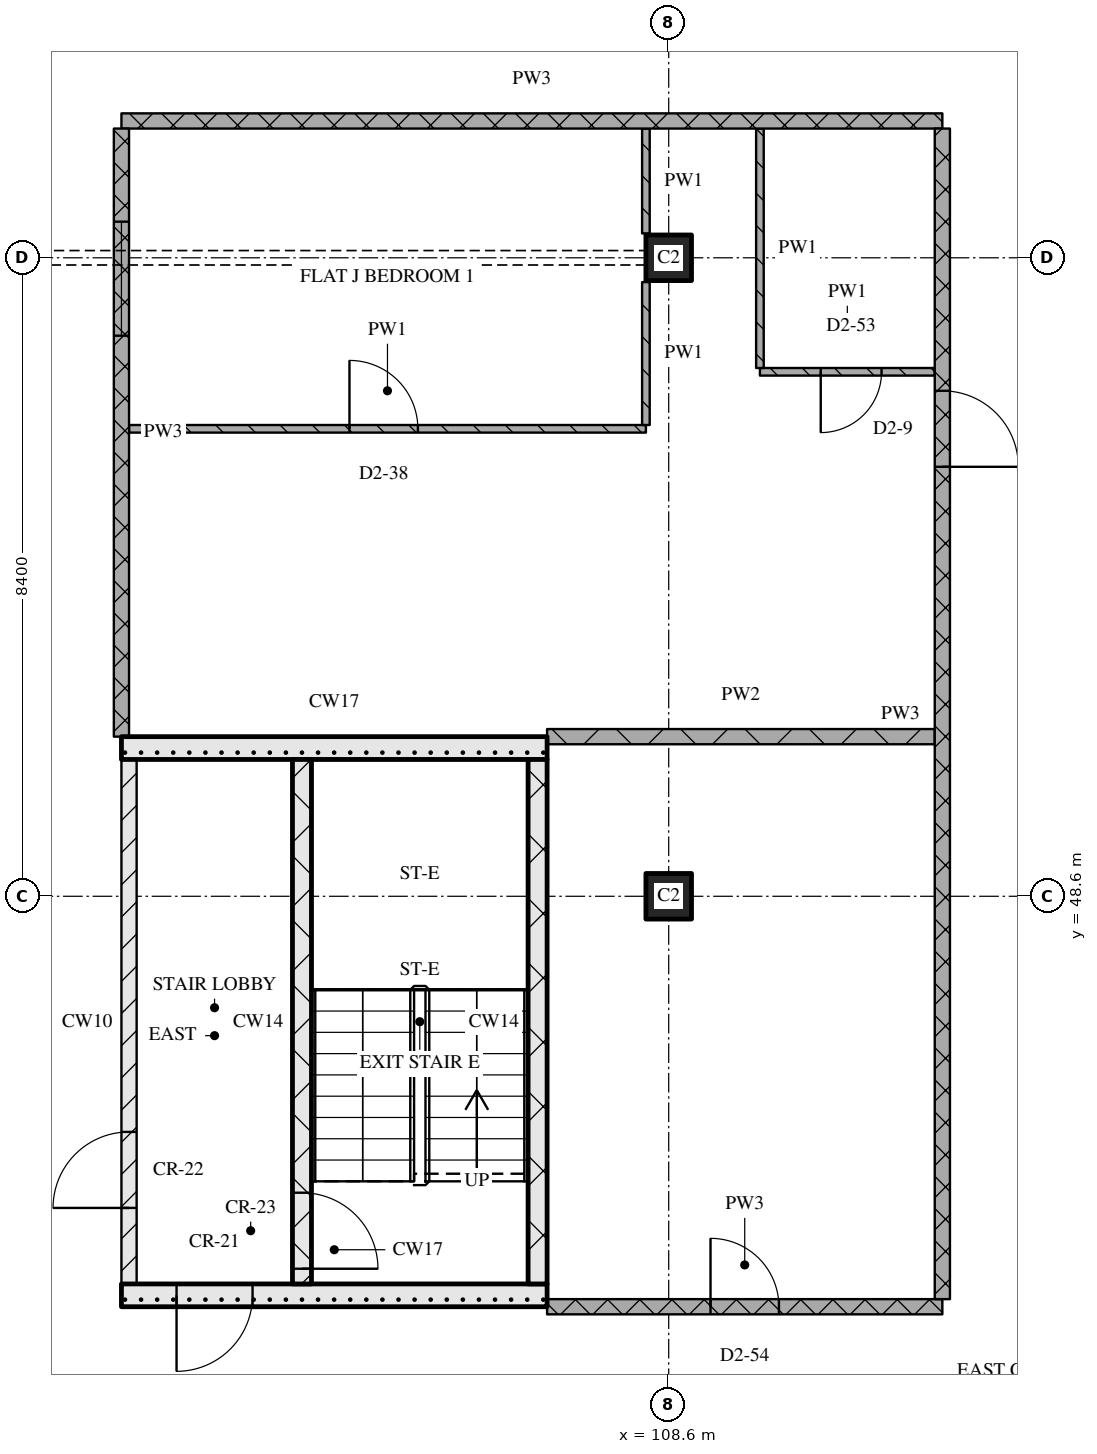
"""IFC4 building model, lengths in metres.
Left out: names, types, materials, properties, quantities, classifications, styles, units other than length and angle.
Written with IfcOpenShell. Run it as: python <this file> out.ifc"""

import sys

from ifc_helpers import new_model, si_unit, direction, frame, frame_2d, origin, origin_2d, place, context, subcontext, project, spatial, rectangle, extrude, element, fill, save


model = new_model("IFC4")
c1 = context("Model", 3, precision=1e-05, world=origin(), true_north=direction((0.0, 1.0)))
c2 = subcontext(c1, "Body", "Model", "MODEL_VIEW")
j1 = project(units=[si_unit("LENGTHUNIT", "METRE"), si_unit("PLANEANGLEUNIT", "RADIAN")], contexts=[c1])
p1 = place(None, origin())
s1 = spatial("IfcSite", under=j1, at=p1, CompositionType="ELEMENT")
p2 = place(p1, origin())
s2 = spatial("IfcBuilding", under=s1, at=p2, CompositionType="ELEMENT")
p3 = place(p2, frame((0.0, 0.0, 223.5)))
s3 = spatial("IfcBuildingStorey", under=s2, at=p3, CompositionType="ELEMENT", Elevation=223.5)
for number, where, z_axis, x_axis in (
    (1, (108.6, 48.6, 0.0), (0.0, 0.0, 1.0), (1.0, 0.0, 0.0)),
    (2, (108.6, 57.0, 0.0), (0.0, 0.0, 1.0), (1.0, 0.0, 0.0)),
):
    element("IfcColumn", number, at=place(p3, frame(where, z_axis=z_axis, x_axis=x_axis)), inside=s3, PredefinedType="COLUMN", context=c2, shape_type="SweptSolid", body=[
        extrude(rectangle(XDim=0.6, YDim=0.6, at=origin_2d()), origin(), (0.0, 0.0, 1.0), 3.6),
    ])
p4 = place(p3, frame((101.4, 43.35, 0.0), z_axis=(0.0, 0.0, 1.0), x_axis=(1.0, 0.0, 0.0)))
e3 = element("IfcWall", 3, at=p4, inside=s3, PredefinedType="SOLIDWALL", context=c2, shape_type="SweptSolid", body=[
    extrude(rectangle(XDim=5.6, YDim=0.3, at=frame_2d((2.8, 0.0))), origin(), (0.0, 0.0, 1.0), 3.32),
])
p5 = place(p4, frame((0.725, 0.0, 0.0)))
e4 = element("IfcOpeningElement", 4, at=p5, cuts=e3, PredefinedType="OPENING", context=c2, shape_type="SweptSolid", body=[
    extrude(rectangle(XDim=1.0, YDim=2.1, at=frame_2d((0.5, 1.05))), frame((0.0, 0.16, 0.0), z_axis=(0.0, -1.0, 0.0), x_axis=(1.0, 0.0, 0.0)), (0.0, 0.0, 1.0), 0.32),
])
p6 = place(p3, frame((101.5, 43.5, 0.0), z_axis=(0.0, 0.0, 1.0), x_axis=(0.0, 1.0, 0.0)))
e5 = element("IfcWall", 5, at=p6, inside=s3, PredefinedType="PARTITIONING", context=c2, shape_type="SweptSolid", body=[
    extrude(rectangle(XDim=6.9, YDim=0.2, at=frame_2d((3.45, 0.0))), origin(), (0.0, 0.0, 1.0), 3.32),
])
p7 = place(p6, frame((1.0, 0.0, 0.0)))
e6 = element("IfcOpeningElement", 6, at=p7, cuts=e5, PredefinedType="OPENING", context=c2, shape_type="SweptSolid", body=[
    extrude(rectangle(XDim=1.0, YDim=2.1, at=frame_2d((0.5, 1.05))), frame((0.0, 0.11, 0.0), z_axis=(0.0, -1.0, 0.0), x_axis=(1.0, 0.0, 0.0)), (0.0, 0.0, 1.0), 0.22),
])
p8 = place(p3, frame((103.775, 43.5, 0.0), z_axis=(0.0, 0.0, 1.0), x_axis=(0.0, 1.0, 0.0)))
e7 = element("IfcWall", 7, at=p8, inside=s3, PredefinedType="SOLIDWALL", context=c2, shape_type="SweptSolid", body=[
    extrude(rectangle(XDim=6.9, YDim=0.25, at=frame_2d((3.45, 0.0))), origin(), (0.0, 0.0, 1.0), 3.32),
])
p9 = place(p8, frame((0.2, 0.0, 0.0)))
e8 = element("IfcOpeningElement", 8, at=p9, cuts=e7, PredefinedType="OPENING", context=c2, shape_type="SweptSolid", body=[
    extrude(rectangle(XDim=1.0, YDim=2.1, at=frame_2d((0.5, 1.05))), frame((0.0, 0.135, 0.0), z_axis=(0.0, -1.0, 0.0), x_axis=(1.0, 0.0, 0.0)), (0.0, 0.0, 1.0), 0.27),
])
p10 = place(p3, frame((106.875, 43.5, 0.0), z_axis=(0.0, 0.0, 1.0), x_axis=(0.0, 1.0, 0.0)))
e9 = element("IfcWall", 9, at=p10, inside=s3, PredefinedType="SOLIDWALL", context=c2, shape_type="SweptSolid", body=[
    extrude(rectangle(XDim=6.9, YDim=0.25, at=frame_2d((3.45, 0.0))), origin(), (0.0, 0.0, 1.0), 3.32),
])
p11 = place(p3, frame((101.4, 50.55, 0.0), z_axis=(0.0, 0.0, 1.0), x_axis=(1.0, 0.0, 0.0)))
e10 = element("IfcWall", 10, at=p11, inside=s3, PredefinedType="SOLIDWALL", context=c2, shape_type="SweptSolid", body=[
    extrude(rectangle(XDim=5.6, YDim=0.3, at=frame_2d((2.8, 0.0))), origin(), (0.0, 0.0, 1.0), 3.32),
])
p12 = place(p3, frame((107.0, 43.2, 0.0), z_axis=(0.0, 0.0, 1.0), x_axis=(1.0, 0.0, 0.0)))
e11 = element("IfcWall", 11, at=p12, inside=s3, PredefinedType="PARTITIONING", context=c2, shape_type="SweptSolid", body=[
    extrude(rectangle(XDim=5.2, YDim=0.2, at=frame_2d((2.6, 0.0))), origin(), (0.0, 0.0, 1.0), 3.32),
])
p13 = place(p12, frame((2.15, 0.0, 0.0)))
e12 = element("IfcOpeningElement", 12, at=p13, cuts=e11, PredefinedType="OPENING", context=c2, shape_type="SweptSolid", body=[
    extrude(rectangle(XDim=0.9, YDim=2.1, at=frame_2d((0.45, 1.05))), frame((0.0, 0.11, 0.0), z_axis=(0.0, -1.0, 0.0), x_axis=(1.0, 0.0, 0.0)), (0.0, 0.0, 1.0), 0.22),
])
p14 = place(p3, frame((107.0, 50.7, 0.0), z_axis=(0.0, 0.0, 1.0), x_axis=(1.0, 0.0, 0.0)))
e13 = element("IfcWall", 13, at=p14, inside=s3, PredefinedType="PARTITIONING", context=c2, shape_type="SweptSolid", body=[
    extrude(rectangle(XDim=5.1, YDim=0.2, at=frame_2d((2.55, 0.0))), origin(), (0.0, 0.0, 1.0), 3.32),
])
p15 = place(p3, frame((101.5, 54.75, 0.0), z_axis=(0.0, 0.0, 1.0), x_axis=(1.0, 0.0, 0.0)))
e14 = element("IfcWall", 14, at=p15, inside=s3, PredefinedType="PARTITIONING", context=c2, shape_type="SweptSolid", body=[
    extrude(rectangle(XDim=6.8, YDim=0.1, at=frame_2d((3.4, 0.0))), origin(), (0.0, 0.0, 1.0), 3.32),
])
p16 = place(p15, frame((2.9, 0.0, 0.0)))
e15 = element("IfcOpeningElement", 15, at=p16, cuts=e14, PredefinedType="OPENING", context=c2, shape_type="SweptSolid", body=[
    extrude(rectangle(XDim=0.9, YDim=2.1, at=frame_2d((0.45, 1.05))), frame((0.0, 0.06, 0.0), z_axis=(0.0, -1.0, 0.0), x_axis=(1.0, 0.0, 0.0)), (0.0, 0.0, 1.0), 0.12),
])
p17 = place(p3, frame((109.8, 55.5, 0.0), z_axis=(0.0, 0.0, 1.0), x_axis=(1.0, 0.0, 0.0)))
e16 = element("IfcWall", 16, at=p17, inside=s3, PredefinedType="PARTITIONING", context=c2, shape_type="SweptSolid", body=[
    extrude(rectangle(XDim=2.3, YDim=0.1, at=frame_2d((1.15, 0.0))), origin(), (0.0, 0.0, 1.0), 3.32),
])
p18 = place(p17, frame((0.8, 0.0, 0.0)))
e17 = element("IfcOpeningElement", 17, at=p18, cuts=e16, PredefinedType="OPENING", context=c2, shape_type="SweptSolid", body=[
    extrude(rectangle(XDim=0.8, YDim=2.1, at=frame_2d((0.4, 1.05))), frame((0.0, 0.06, 0.0), z_axis=(0.0, -1.0, 0.0), x_axis=(1.0, 0.0, 0.0)), (0.0, 0.0, 1.0), 0.12),
])
p19 = place(p3, frame((101.4, 58.8, 0.0), z_axis=(0.0, 0.0, 1.0), x_axis=(1.0, 0.0, 0.0)))
e18 = element("IfcWall", 18, at=p19, inside=s3, PredefinedType="PARTITIONING", context=c2, shape_type="SweptSolid", body=[
    extrude(rectangle(XDim=10.8, YDim=0.2, at=frame_2d((5.4, 0.0))), origin(), (0.0, 0.0, 1.0), 3.32),
])
p20 = place(p3, frame((101.4, 58.7, 0.0), z_axis=(0.0, 0.0, 1.0), x_axis=(0.0, -1.0, 0.0)))
e19 = element("IfcWall", 19, at=p20, inside=s3, PredefinedType="PARTITIONING", context=c2, shape_type="SweptSolid", body=[
    extrude(rectangle(XDim=8.0, YDim=0.2, at=frame_2d((4.0, 0.0))), origin(), (0.0, 0.0, 1.0), 3.32),
])
p21 = place(p20, frame((1.225, 0.0, 0.9)))
e20 = element("IfcOpeningElement", 20, at=p21, cuts=e19, PredefinedType="OPENING", context=c2, shape_type="SweptSolid", body=[
    extrude(rectangle(XDim=1.5, YDim=1.5, at=frame_2d((0.75, 0.75))), frame((0.0, 0.11, 0.0), z_axis=(0.0, -1.0, 0.0), x_axis=(1.0, 0.0, 0.0)), (0.0, 0.0, 1.0), 0.22),
])
p22 = place(p3, frame((108.3, 56.68, 0.0), z_axis=(0.0, 0.0, 1.0), x_axis=(0.0, -1.0, 0.0)))
e21 = element("IfcWall", 21, at=p22, inside=s3, PredefinedType="PARTITIONING", context=c2, shape_type="SweptSolid", body=[
    extrude(rectangle(XDim=1.88, YDim=0.1, at=frame_2d((0.94, 0.0))), origin(), (0.0, 0.0, 1.0), 3.32),
])
p23 = place(p3, frame((108.3, 58.7, 0.0), z_axis=(0.0, 0.0, 1.0), x_axis=(0.0, -1.0, 0.0)))
e22 = element("IfcWall", 22, at=p23, inside=s3, PredefinedType="PARTITIONING", context=c2, shape_type="SweptSolid", body=[
    extrude(rectangle(XDim=1.38, YDim=0.1, at=frame_2d((0.69, 0.0))), origin(), (0.0, 0.0, 1.0), 3.32),
])
p24 = place(p3, frame((109.8, 58.7, 0.0), z_axis=(0.0, 0.0, 1.0), x_axis=(0.0, -1.0, 0.0)))
e23 = element("IfcWall", 23, at=p24, inside=s3, PredefinedType="PARTITIONING", context=c2, shape_type="SweptSolid", body=[
    extrude(rectangle(XDim=3.15, YDim=0.1, at=frame_2d((1.575, 0.0))), origin(), (0.0, 0.0, 1.0), 3.32),
])
p25 = place(p3, frame((112.2, 43.3, 0.0), z_axis=(0.0, 0.0, 1.0), x_axis=(0.0, 1.0, 0.0)))
e24 = element("IfcWall", 24, at=p25, inside=s3, PredefinedType="PARTITIONING", context=c2, shape_type="SweptSolid", body=[
    extrude(rectangle(XDim=15.4, YDim=0.2, at=frame_2d((7.7, 0.0))), origin(), (0.0, 0.0, 1.0), 3.32),
])
p26 = place(p25, frame((10.95, 0.0, 0.0)))
e25 = element("IfcOpeningElement", 25, at=p26, cuts=e24, PredefinedType="OPENING", context=c2, shape_type="SweptSolid", body=[
    extrude(rectangle(XDim=1.0, YDim=2.1, at=frame_2d((0.5, 1.05))), frame((0.0, 0.11, 0.0), z_axis=(0.0, -1.0, 0.0), x_axis=(1.0, 0.0, 0.0)), (0.0, 0.0, 1.0), 0.22),
])
p27 = place(p5, origin())
e26 = element("IfcDoor", 26, at=p27, inside=s3, OperationType="SINGLE_SWING_RIGHT", PredefinedType="DOOR", context=c2, shape_type="SweptSolid", body=[
    extrude(rectangle(XDim=1.0, YDim=2.1, at=frame_2d((0.5, 1.05))), frame((0.0, 0.025, 0.0), z_axis=(0.0, -1.0, 0.0), x_axis=(1.0, 0.0, 0.0)), (0.0, 0.0, 1.0), 0.05),
])
fill(e4, e26)
p28 = place(p9, origin())
e27 = element("IfcDoor", 27, at=p28, inside=s3, OperationType="SINGLE_SWING_RIGHT", PredefinedType="DOOR", context=c2, shape_type="SweptSolid", body=[
    extrude(rectangle(XDim=1.0, YDim=2.1, at=frame_2d((0.5, 1.05))), frame((0.0, 0.025, 0.0), z_axis=(0.0, -1.0, 0.0), x_axis=(1.0, 0.0, 0.0)), (0.0, 0.0, 1.0), 0.05),
])
fill(e8, e27)
p29 = place(p7, origin())
e28 = element("IfcDoor", 28, at=p29, inside=s3, OperationType="SINGLE_SWING_LEFT", PredefinedType="DOOR", context=c2, shape_type="SweptSolid", body=[
    extrude(rectangle(XDim=1.0, YDim=2.1, at=frame_2d((0.5, 1.05))), frame((0.0, 0.025, 0.0), z_axis=(0.0, -1.0, 0.0), x_axis=(1.0, 0.0, 0.0)), (0.0, 0.0, 1.0), 0.05),
])
fill(e6, e28)
p30 = place(p13, origin())
e29 = element("IfcDoor", 29, at=p30, inside=s3, OperationType="SINGLE_SWING_LEFT", PredefinedType="DOOR", context=c2, shape_type="SweptSolid", body=[
    extrude(rectangle(XDim=0.9, YDim=2.1, at=frame_2d((0.45, 1.05))), frame((0.0, 0.025, 0.0), z_axis=(0.0, -1.0, 0.0), x_axis=(1.0, 0.0, 0.0)), (0.0, 0.0, 1.0), 0.05),
])
fill(e12, e29)
p31 = place(p16, origin())
e30 = element("IfcDoor", 30, at=p31, inside=s3, OperationType="SINGLE_SWING_LEFT", PredefinedType="DOOR", context=c2, shape_type="SweptSolid", body=[
    extrude(rectangle(XDim=0.9, YDim=2.1, at=frame_2d((0.45, 1.05))), frame((0.0, 0.025, 0.0), z_axis=(0.0, -1.0, 0.0), x_axis=(1.0, 0.0, 0.0)), (0.0, 0.0, 1.0), 0.05),
])
fill(e15, e30)
p32 = place(p18, origin())
e31 = element("IfcDoor", 31, at=p32, inside=s3, OperationType="SINGLE_SWING_RIGHT", PredefinedType="DOOR", context=c2, shape_type="SweptSolid", body=[
    extrude(rectangle(XDim=0.8, YDim=2.1, at=frame_2d((0.4, 1.05))), frame((0.0, 0.025, 0.0), z_axis=(0.0, -1.0, 0.0), x_axis=(1.0, 0.0, 0.0)), (0.0, 0.0, 1.0), 0.05),
])
fill(e17, e31)
p33 = place(p26, origin())
e32 = element("IfcDoor", 32, at=p33, inside=s3, OperationType="SINGLE_SWING_RIGHT", PredefinedType="DOOR", context=c2, shape_type="SweptSolid", body=[
    extrude(rectangle(XDim=1.0, YDim=2.1, at=frame_2d((0.5, 1.05))), frame((0.0, 0.025, 0.0), z_axis=(0.0, -1.0, 0.0), x_axis=(1.0, 0.0, 0.0)), (0.0, 0.0, 1.0), 0.05),
])
fill(e25, e32)
p34 = place(p21, origin())
e33 = element("IfcWindow", 33, at=p34, inside=s3, PartitioningType="SINGLE_PANEL", PredefinedType="WINDOW", context=c2, shape_type="SweptSolid", body=[
    extrude(rectangle(XDim=1.5, YDim=1.5, at=frame_2d((0.75, 0.75))), frame((0.0, 0.03, 0.0), z_axis=(0.0, -1.0, 0.0), x_axis=(1.0, 0.0, 0.0)), (0.0, 0.0, 1.0), 0.06),
])
fill(e20, e33)
save(model, sys.argv[1])
